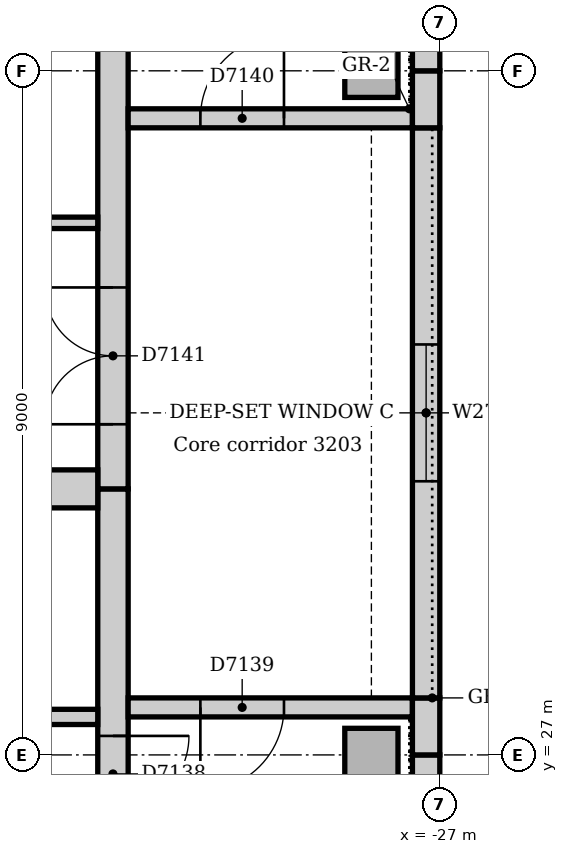
"""IFC4 building model, lengths in metres.
Left out: names, types, materials, properties, quantities, classifications, styles, units other than length and angle.
Written with IfcOpenShell. Run it as: python <this file> out.ifc"""

import sys

from ifc_helpers import new_model, si_unit, direction, frame, frame_2d, origin, origin_2d, place, context, subcontext, project, spatial, rectangle, extrude, element, fill, save


model = new_model("IFC4")
c1 = context("Model", 3, precision=1e-05, world=origin(), true_north=direction((0.0, 1.0)))
c2 = subcontext(c1, "Body", "Model", "MODEL_VIEW")
j1 = project(units=[si_unit("LENGTHUNIT", "METRE"), si_unit("PLANEANGLEUNIT", "RADIAN")], contexts=[c1])
p1 = place(None, origin())
s1 = spatial("IfcSite", under=j1, at=p1, CompositionType="ELEMENT")
p2 = place(p1, origin())
s2 = spatial("IfcBuilding", under=s1, at=p2, CompositionType="ELEMENT")
p3 = place(p2, frame((0.0, 0.0, 136.0)))
s3 = spatial("IfcBuildingStorey", under=s2, at=p3, CompositionType="ELEMENT", Elevation=136.0)
p4 = place(p3, frame((-31.3, 21.0, 0.0), z_axis=(0.0, 0.0, 1.0), x_axis=(0.0, 1.0, 0.0)))
e1 = element("IfcWall", 1, at=p4, inside=s3, PredefinedType="SOLIDWALL", context=c2, shape_type="SweptSolid", body=[
    extrude(rectangle(XDim=9.5, YDim=0.4, at=frame_2d((4.75, 0.0))), origin(), (0.0, 0.0, 1.0), 4.0),
])
p5 = place(p4, frame((5.25, 0.0, 0.0)))
e2 = element("IfcOpeningElement", 2, at=p5, cuts=e1, PredefinedType="OPENING", context=c2, shape_type="SweptSolid", body=[
    extrude(rectangle(XDim=1.0, YDim=2.1, at=frame_2d((0.5, 1.05))), frame((0.0, 0.21, 0.0), z_axis=(0.0, -1.0, 0.0), x_axis=(1.0, 0.0, 0.0)), (0.0, 0.0, 1.0), 0.42),
])
p6 = place(p3, frame((-31.3, 30.5, 0.0), z_axis=(0.0, 0.0, 1.0), x_axis=(0.0, 1.0, 0.0)))
e3 = element("IfcWall", 3, at=p6, inside=s3, PredefinedType="SOLIDWALL", context=c2, shape_type="SweptSolid", body=[
    extrude(rectangle(XDim=11.5, YDim=0.4, at=frame_2d((5.75, 0.0))), origin(), (0.0, 0.0, 1.0), 4.0),
])
p7 = place(p6, frame((0.85, 0.0, 0.0)))
e4 = element("IfcOpeningElement", 4, at=p7, cuts=e3, PredefinedType="OPENING", context=c2, shape_type="SweptSolid", body=[
    extrude(rectangle(XDim=1.8, YDim=2.1, at=frame_2d((0.9, 1.05))), frame((0.0, 0.21, 0.0), z_axis=(0.0, -1.0, 0.0), x_axis=(1.0, 0.0, 0.0)), (0.0, 0.0, 1.0), 0.42),
])
p8 = place(p3, frame((-42.0, 30.5, 0.0), z_axis=(0.0, 0.0, 1.0), x_axis=(1.0, 0.0, 0.0)))
e5 = element("IfcWall", 5, at=p8, inside=s3, PredefinedType="SOLIDWALL", context=c2, shape_type="SweptSolid", body=[
    extrude(rectangle(XDim=10.5, YDim=0.5, at=frame_2d((5.25, 0.0))), origin(), (0.0, 0.0, 1.0), 4.0),
])
p9 = place(p3, frame((-27.36, 27.625, 0.0), z_axis=(0.0, 0.0, 1.0), x_axis=(-1.0, 0.0, 0.0)))
e6 = element("IfcWall", 6, at=p9, inside=s3, PredefinedType="SOLIDWALL", context=c2, shape_type="SweptSolid", body=[
    extrude(rectangle(XDim=3.74, YDim=0.25, at=frame_2d((1.87, 0.0))), origin(), (0.0, 0.0, 1.0), 4.0),
])
p10 = place(p9, frame((1.69, 0.0, 0.0)))
e7 = element("IfcOpeningElement", 7, at=p10, cuts=e6, PredefinedType="OPENING", context=c2, shape_type="SweptSolid", body=[
    extrude(rectangle(XDim=1.1, YDim=2.1, at=frame_2d((0.55, 1.05))), frame((0.0, 0.135, 0.0), z_axis=(0.0, -1.0, 0.0), x_axis=(1.0, 0.0, 0.0)), (0.0, 0.0, 1.0), 0.27),
])
p11 = place(p3, frame((-31.1, 35.375, 0.0), z_axis=(0.0, 0.0, 1.0), x_axis=(1.0, 0.0, 0.0)))
e8 = element("IfcWall", 8, at=p11, inside=s3, PredefinedType="SOLIDWALL", context=c2, shape_type="SweptSolid", body=[
    extrude(rectangle(XDim=3.74, YDim=0.25, at=frame_2d((1.87, 0.0))), origin(), (0.0, 0.0, 1.0), 4.0),
])
p12 = place(p11, frame((0.95, 0.0, 0.0)))
e9 = element("IfcOpeningElement", 9, at=p12, cuts=e8, PredefinedType="OPENING", context=c2, shape_type="SweptSolid", body=[
    extrude(rectangle(XDim=1.1, YDim=2.1, at=frame_2d((0.55, 1.05))), frame((0.0, 0.135, 0.0), z_axis=(0.0, -1.0, 0.0), x_axis=(1.0, 0.0, 0.0)), (0.0, 0.0, 1.0), 0.27),
])
for number, where, z_axis, x_axis in (
    (10, (-27.9, 27.0, 0.0), (0.0, 0.0, 1.0), (1.0, 0.0, 0.0)),
    (11, (-27.9, 36.0, 0.0), (0.0, 0.0, 1.0), (1.0, 0.0, 0.0)),
):
    element("IfcColumn", number, at=place(p3, frame(where, z_axis=z_axis, x_axis=x_axis)), inside=s3, PredefinedType="COLUMN", context=c2, shape_type="SweptSolid", body=[
        extrude(rectangle(XDim=0.7, YDim=0.7, at=origin_2d()), origin(), (0.0, 0.0, 1.0), 4.0),
    ])
p13 = place(p3, frame((-27.18, 21.0, 0.0), z_axis=(0.0, 0.0, 1.0), x_axis=(0.0, 1.0, 0.0)))
e12 = element("IfcWall", 12, at=p13, inside=s3, PredefinedType="STANDARD", context=c2, shape_type="SweptSolid", body=[
    extrude(rectangle(XDim=6.0, YDim=0.36, at=frame_2d((3.0, 0.0))), origin(), (0.0, 0.0, 1.0), 3.85),
])
p14 = place(p3, frame((-27.18, 27.0, 0.0), z_axis=(0.0, 0.0, 1.0), x_axis=(0.0, 1.0, 0.0)))
e13 = element("IfcWall", 13, at=p14, inside=s3, PredefinedType="STANDARD", context=c2, shape_type="SweptSolid", body=[
    extrude(rectangle(XDim=0.75, YDim=0.36, at=frame_2d((0.375, 0.0))), origin(), (0.0, 0.0, 1.0), 3.436),
])
p15 = place(p3, frame((-27.18, 27.75, 0.0), z_axis=(0.0, 0.0, 1.0), x_axis=(0.0, 1.0, 0.0)))
e14 = element("IfcWall", 14, at=p15, inside=s3, PredefinedType="STANDARD", context=c2, shape_type="SweptSolid", body=[
    extrude(rectangle(XDim=7.5, YDim=0.36, at=frame_2d((3.75, 0.0))), origin(), (0.0, 0.0, 1.0), 3.436),
])
p16 = place(p15, frame((2.85, 0.0, 1.2)))
e15 = element("IfcOpeningElement", 15, at=p16, cuts=e14, PredefinedType="OPENING", context=c2, shape_type="SweptSolid", body=[
    extrude(rectangle(XDim=1.8, YDim=1.2, at=frame_2d((0.9, 0.6))), frame((0.0, 0.19, 0.0), z_axis=(0.0, -1.0, 0.0), x_axis=(1.0, 0.0, 0.0)), (0.0, 0.0, 1.0), 0.38),
])
p17 = place(p3, frame((-27.18, 35.25, 0.0), z_axis=(0.0, 0.0, 1.0), x_axis=(0.0, 1.0, 0.0)))
e16 = element("IfcWall", 16, at=p17, inside=s3, PredefinedType="STANDARD", context=c2, shape_type="SweptSolid", body=[
    extrude(rectangle(XDim=0.75, YDim=0.36, at=frame_2d((0.375, 0.0))), origin(), (0.0, 0.0, 1.0), 3.436),
])
p18 = place(p3, frame((-27.18, 36.0, 0.0), z_axis=(0.0, 0.0, 1.0), x_axis=(0.0, 1.0, 0.0)))
e17 = element("IfcWall", 17, at=p18, inside=s3, PredefinedType="STANDARD", context=c2, shape_type="SweptSolid", body=[
    extrude(rectangle(XDim=6.0, YDim=0.36, at=frame_2d((3.0, 0.0))), origin(), (0.0, 0.0, 1.0), 3.85),
])
p19 = place(p3, frame((-34.9, 27.5, 0.0), z_axis=(0.0, 0.0, 1.0), x_axis=(1.0, 0.0, 0.0)))
e18 = element("IfcWall", 18, at=p19, inside=s3, PredefinedType="SOLIDWALL", context=c2, shape_type="SweptSolid", body=[
    extrude(rectangle(XDim=3.4, YDim=0.2, at=frame_2d((1.7, 0.0))), origin(), (0.0, 0.0, 1.0), 4.0),
])
p20 = place(p19, frame((1.1, 0.0, 0.0)))
e19 = element("IfcOpeningElement", 19, at=p20, cuts=e18, PredefinedType="OPENING", context=c2, shape_type="SweptSolid", body=[
    extrude(rectangle(XDim=1.1, YDim=2.1, at=frame_2d((0.55, 1.05))), frame((0.0, 0.11, 0.0), z_axis=(0.0, -1.0, 0.0), x_axis=(1.0, 0.0, 0.0)), (0.0, 0.0, 1.0), 0.22),
])
p21 = place(p3, frame((-34.075, 34.0, 0.0), z_axis=(0.0, 0.0, 1.0), x_axis=(1.0, 0.0, 0.0)))
e20 = element("IfcWall", 20, at=p21, inside=s3, PredefinedType="SOLIDWALL", context=c2, shape_type="SweptSolid", body=[
    extrude(rectangle(XDim=2.575, YDim=0.15, at=frame_2d((1.288, 0.0))), origin(), (0.0, 0.0, 1.0), 4.0),
])
p22 = place(p16, origin())
e21 = element("IfcWindow", 21, at=p22, inside=s3, PartitioningType="SINGLE_PANEL", PredefinedType="WINDOW", context=c2, shape_type="SweptSolid", body=[
    extrude(rectangle(XDim=1.8, YDim=1.2, at=frame_2d((0.9, 0.6))), frame((0.0, 0.13, 0.0), z_axis=(0.0, -1.0, 0.0), x_axis=(1.0, 0.0, 0.0)), (0.0, 0.0, 1.0), 0.06),
])
fill(e15, e21)
p23 = place(p5, frame((1.0, 0.0, 0.0), z_axis=(0.0, 0.0, 1.0), x_axis=(-1.0, 0.0, 0.0)))
e22 = element("IfcDoor", 22, at=p23, inside=s3, OperationType="SINGLE_SWING_LEFT", PredefinedType="DOOR", context=c2, shape_type="SweptSolid", body=[
    extrude(rectangle(XDim=1.0, YDim=2.1, at=frame_2d((0.5, 1.05))), frame((0.0, 0.025, 0.0), z_axis=(0.0, -1.0, 0.0), x_axis=(1.0, 0.0, 0.0)), (0.0, 0.0, 1.0), 0.05),
])
fill(e2, e22)
p24 = place(p10, origin())
e23 = element("IfcDoor", 23, at=p24, inside=s3, OperationType="SINGLE_SWING_RIGHT", PredefinedType="DOOR", context=c2, shape_type="SweptSolid", body=[
    extrude(rectangle(XDim=1.1, YDim=2.1, at=frame_2d((0.55, 1.05))), frame((0.0, 0.025, 0.0), z_axis=(0.0, -1.0, 0.0), x_axis=(1.0, 0.0, 0.0)), (0.0, 0.0, 1.0), 0.05),
])
fill(e7, e23)
p25 = place(p12, origin())
e24 = element("IfcDoor", 24, at=p25, inside=s3, OperationType="SINGLE_SWING_RIGHT", PredefinedType="DOOR", context=c2, shape_type="SweptSolid", body=[
    extrude(rectangle(XDim=1.1, YDim=2.1, at=frame_2d((0.55, 1.05))), frame((0.0, 0.025, 0.0), z_axis=(0.0, -1.0, 0.0), x_axis=(1.0, 0.0, 0.0)), (0.0, 0.0, 1.0), 0.05),
])
fill(e9, e24)
p26 = place(p7, origin())
e25 = element("IfcDoor", 25, at=p26, inside=s3, OperationType="DOUBLE_DOOR_SINGLE_SWING", PredefinedType="DOOR", context=c2, shape_type="SweptSolid", body=[
    extrude(rectangle(XDim=1.8, YDim=2.1, at=frame_2d((0.9, 1.05))), frame((0.0, 0.025, 0.0), z_axis=(0.0, -1.0, 0.0), x_axis=(1.0, 0.0, 0.0)), (0.0, 0.0, 1.0), 0.05),
])
fill(e4, e25)
save(model, sys.argv[1])
